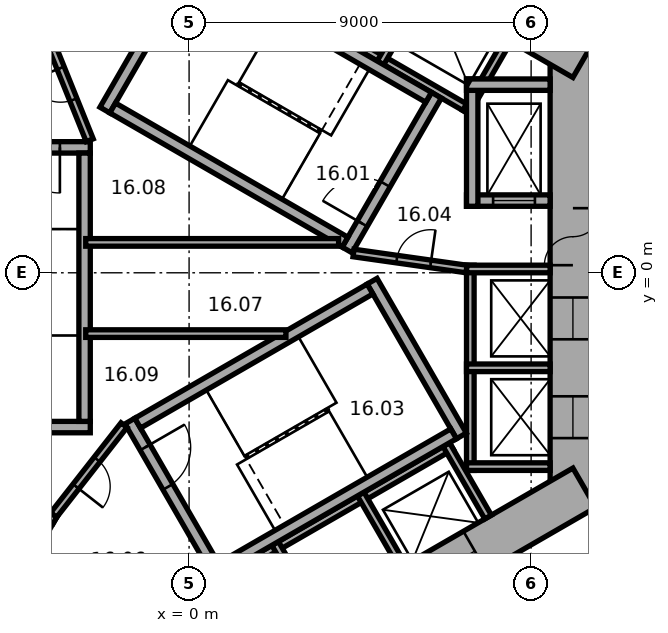
"""IFC4 building model, lengths in metres.
Left out: names, types, materials, properties, quantities, classifications, styles, units other than length and angle.
Written with IfcOpenShell. Run it as: python <this file> out.ifc"""

import sys

from ifc_helpers import new_model, si_unit, direction, frame, frame_2d, origin, place, context, subcontext, project, spatial, rectangle, extrude, element, fill, save


model = new_model("IFC4")
c1 = context("Model", 3, precision=1e-05, world=origin(), true_north=direction((0.0, 1.0)))
c2 = subcontext(c1, "Body", "Model", "MODEL_VIEW")
j1 = project(units=[si_unit("LENGTHUNIT", "METRE"), si_unit("PLANEANGLEUNIT", "RADIAN")], contexts=[c1])
p1 = place(None, origin())
s1 = spatial("IfcSite", under=j1, at=p1, CompositionType="ELEMENT")
p2 = place(p1, origin())
s2 = spatial("IfcBuilding", under=s1, at=p2, CompositionType="ELEMENT")
p3 = place(p2, frame((0.0, 0.0, 73.7)))
s3 = spatial("IfcBuildingStorey", under=s2, at=p3, CompositionType="ELEMENT", Elevation=73.7)
p4 = place(p3, frame((10.1, -6.177, 0.0), z_axis=(0.0, 0.0, 1.0), x_axis=(0.0, 1.0, 0.0)))
e1 = element("IfcWall", 1, at=p4, inside=s3, PredefinedType="SHEAR", context=c2, shape_type="SweptSolid", body=[
    extrude(rectangle(XDim=12.355, YDim=1.2, at=frame_2d((6.177, 0.0))), origin(), (0.0, 0.0, 1.0), 3.3),
])
p5 = place(p4, frame((6.378, 0.0, 0.0)))
e2 = element("IfcOpeningElement", 2, at=p5, cuts=e1, PredefinedType="OPENING", context=c2, shape_type="SweptSolid", body=[
    extrude(rectangle(XDim=1.5, YDim=2.1, at=frame_2d((0.75, 1.05))), frame((0.0, 0.61, 0.0), z_axis=(0.0, -1.0, 0.0), x_axis=(1.0, 0.0, 0.0)), (0.0, 0.0, 1.0), 1.22),
])
p6 = place(p4, frame((1.828, 0.0, 0.0)))
e3 = element("IfcOpeningElement", 3, at=p6, cuts=e1, PredefinedType="OPENING", context=c2, shape_type="SweptSolid", body=[
    extrude(rectangle(XDim=1.1, YDim=2.1, at=frame_2d((0.55, 1.05))), frame((0.0, 0.61, 0.0), z_axis=(0.0, -1.0, 0.0), x_axis=(1.0, 0.0, 0.0)), (0.0, 0.0, 1.0), 1.22),
])
p7 = place(p4, frame((4.427, 0.0, 0.0)))
e4 = element("IfcOpeningElement", 4, at=p7, cuts=e1, PredefinedType="OPENING", context=c2, shape_type="SweptSolid", body=[
    extrude(rectangle(XDim=1.1, YDim=2.1, at=frame_2d((0.55, 1.05))), frame((0.0, 0.61, 0.0), z_axis=(0.0, -1.0, 0.0), x_axis=(1.0, 0.0, 0.0)), (0.0, 0.0, 1.0), 1.22),
])
p8 = place(p3, frame((10.4, 5.658, 0.0), z_axis=(0.0, 0.0, 1.0), x_axis=(-0.866021384402, 0.500006961711, 0.0)))
e5 = element("IfcWall", 5, at=p8, inside=s3, PredefinedType="SHEAR", context=c2, shape_type="SweptSolid", body=[
    extrude(rectangle(XDim=12.355, YDim=1.2, at=frame_2d((6.178, 0.0))), origin(), (0.0, 0.0, 1.0), 3.3),
])
p9 = place(p8, frame((2.728, 0.0, 0.0)))
e6 = element("IfcOpeningElement", 6, at=p9, cuts=e5, PredefinedType="OPENING", context=c2, shape_type="SweptSolid", body=[
    extrude(rectangle(XDim=1.1, YDim=2.1, at=frame_2d((0.55, 1.05))), frame((0.0, 0.61, 0.0), z_axis=(0.0, -1.0, 0.0), x_axis=(1.0, 0.0, 0.0)), (0.0, 0.0, 1.0), 1.22),
])
p10 = place(p8, frame((5.328, 0.0, 0.0)))
e7 = element("IfcOpeningElement", 7, at=p10, cuts=e5, PredefinedType="OPENING", context=c2, shape_type="SweptSolid", body=[
    extrude(rectangle(XDim=1.1, YDim=2.1, at=frame_2d((0.55, 1.05))), frame((0.0, 0.61, 0.0), z_axis=(0.0, -1.0, 0.0), x_axis=(1.0, 0.0, 0.0)), (0.0, 0.0, 1.0), 1.22),
])
p11 = place(p8, frame((7.928, 0.0, 0.0)))
e8 = element("IfcOpeningElement", 8, at=p11, cuts=e5, PredefinedType="OPENING", context=c2, shape_type="SweptSolid", body=[
    extrude(rectangle(XDim=1.1, YDim=2.1, at=frame_2d((0.55, 1.05))), frame((0.0, 0.61, 0.0), z_axis=(0.0, -1.0, 0.0), x_axis=(1.0, 0.0, 0.0)), (0.0, 0.0, 1.0), 1.22),
])
p12 = place(p3, frame((0.3, 11.836, 0.0), z_axis=(0.0, 0.0, 1.0), x_axis=(-0.866021384402, -0.500006961711, 0.0)))
e9 = element("IfcWall", 9, at=p12, inside=s3, PredefinedType="SHEAR", context=c2, shape_type="SweptSolid", body=[
    extrude(rectangle(XDim=12.355, YDim=1.2, at=frame_2d((6.178, 0.0))), origin(), (0.0, 0.0, 1.0), 3.3),
])
p13 = place(p12, frame((6.378, 0.0, 0.0)))
e10 = element("IfcOpeningElement", 10, at=p13, cuts=e9, PredefinedType="OPENING", context=c2, shape_type="SweptSolid", body=[
    extrude(rectangle(XDim=1.5, YDim=2.1, at=frame_2d((0.75, 1.05))), frame((0.0, 0.61, 0.0), z_axis=(0.0, -1.0, 0.0), x_axis=(1.0, 0.0, 0.0)), (0.0, 0.0, 1.0), 1.22),
])
p14 = place(p12, frame((1.828, 0.0, 0.0)))
e11 = element("IfcOpeningElement", 11, at=p14, cuts=e9, PredefinedType="OPENING", context=c2, shape_type="SweptSolid", body=[
    extrude(rectangle(XDim=1.1, YDim=2.1, at=frame_2d((0.55, 1.05))), frame((0.0, 0.61, 0.0), z_axis=(0.0, -1.0, 0.0), x_axis=(1.0, 0.0, 0.0)), (0.0, 0.0, 1.0), 1.22),
])
p15 = place(p3, frame((-10.4, -5.658, 0.0), z_axis=(0.0, 0.0, 1.0), x_axis=(0.866021384402, -0.500006961711, 0.0)))
e12 = element("IfcWall", 12, at=p15, inside=s3, PredefinedType="SHEAR", context=c2, shape_type="SweptSolid", body=[
    extrude(rectangle(XDim=12.355, YDim=1.2, at=frame_2d((6.178, 0.0))), origin(), (0.0, 0.0, 1.0), 3.3),
])
p16 = place(p15, frame((6.378, 0.0, 0.0)))
e13 = element("IfcOpeningElement", 13, at=p16, cuts=e12, PredefinedType="OPENING", context=c2, shape_type="SweptSolid", body=[
    extrude(rectangle(XDim=1.5, YDim=2.1, at=frame_2d((0.75, 1.05))), frame((0.0, 0.61, 0.0), z_axis=(0.0, -1.0, 0.0), x_axis=(1.0, 0.0, 0.0)), (0.0, 0.0, 1.0), 1.22),
])
p17 = place(p15, frame((3.228, 0.0, 0.0)))
e14 = element("IfcOpeningElement", 14, at=p17, cuts=e12, PredefinedType="OPENING", context=c2, shape_type="SweptSolid", body=[
    extrude(rectangle(XDim=0.9, YDim=2.1, at=frame_2d((0.45, 1.05))), frame((0.0, 0.61, 0.0), z_axis=(0.0, -1.0, 0.0), x_axis=(1.0, 0.0, 0.0)), (0.0, 0.0, 1.0), 1.22),
])
p18 = place(p3, frame((-0.3, -11.836, 0.0), z_axis=(0.0, 0.0, 1.0), x_axis=(0.866021384402, 0.500006961711, 0.0)))
e15 = element("IfcWall", 15, at=p18, inside=s3, PredefinedType="SHEAR", context=c2, shape_type="SweptSolid", body=[
    extrude(rectangle(XDim=12.355, YDim=1.2, at=frame_2d((6.178, 0.0))), origin(), (0.0, 0.0, 1.0), 3.3),
])
p19 = place(p18, frame((2.828, 0.0, 0.0)))
e16 = element("IfcOpeningElement", 16, at=p19, cuts=e15, PredefinedType="OPENING", context=c2, shape_type="SweptSolid", body=[
    extrude(rectangle(XDim=0.9, YDim=2.1, at=frame_2d((0.45, 1.05))), frame((0.0, 0.61, 0.0), z_axis=(0.0, -1.0, 0.0), x_axis=(1.0, 0.0, 0.0)), (0.0, 0.0, 1.0), 1.22),
])
p20 = place(p18, frame((5.428, 0.0, 0.0)))
e17 = element("IfcOpeningElement", 17, at=p20, cuts=e15, PredefinedType="OPENING", context=c2, shape_type="SweptSolid", body=[
    extrude(rectangle(XDim=0.9, YDim=2.1, at=frame_2d((0.45, 1.05))), frame((0.0, 0.61, 0.0), z_axis=(0.0, -1.0, 0.0), x_axis=(1.0, 0.0, 0.0)), (0.0, 0.0, 1.0), 1.22),
])
p21 = place(p18, frame((7.928, 0.0, 0.0)))
e18 = element("IfcOpeningElement", 18, at=p21, cuts=e15, PredefinedType="OPENING", context=c2, shape_type="SweptSolid", body=[
    extrude(rectangle(XDim=1.1, YDim=2.1, at=frame_2d((0.55, 1.05))), frame((0.0, 0.61, 0.0), z_axis=(0.0, -1.0, 0.0), x_axis=(1.0, 0.0, 0.0)), (0.0, 0.0, 1.0), 1.22),
])
p22 = place(p3, frame((7.4, -5.2, 0.0), z_axis=(0.0, 0.0, 1.0), x_axis=(0.0, 1.0, 0.0)))
e19 = element("IfcWall", 19, at=p22, inside=s3, PredefinedType="PARTITIONING", context=c2, shape_type="SweptSolid", body=[
    extrude(rectangle(XDim=5.4, YDim=0.2, at=frame_2d((2.7, 0.0))), origin(), (0.0, 0.0, 1.0), 2.95),
])
for number, where, z_axis, x_axis in (
    (20, (7.3, -5.1, 0.0), (0.0, 0.0, 1.0), (1.0, 0.0, 0.0)),
    (21, (7.3, -2.5, 0.0), (0.0, 0.0, 1.0), (1.0, 0.0, 0.0)),
    (22, (7.3, 0.1, 0.0), (0.0, 0.0, 1.0), (1.0, 0.0, 0.0)),
):
    element("IfcWall", number, at=place(p3, frame(where, z_axis=z_axis, x_axis=x_axis)), inside=s3, PredefinedType="PARTITIONING", context=c2, shape_type="SweptSolid", body=[
        extrude(rectangle(XDim=2.2, YDim=0.2, at=frame_2d((1.1, 0.0))), origin(), (0.0, 0.0, 1.0), 2.95),
    ])
p23 = place(p3, frame((7.424, 4.259, 0.0), z_axis=(0.0, 0.0, 1.0), x_axis=(-0.866026010844, 0.49999894854, 0.0)))
e23 = element("IfcWall", 23, at=p23, inside=s3, PredefinedType="PARTITIONING", context=c2, shape_type="SweptSolid", body=[
    extrude(rectangle(XDim=8.0, YDim=0.2, at=frame_2d((4.0, 0.0))), origin(), (0.0, 0.0, 1.0), 2.95),
])
for number, where, z_axis, x_axis in (
    (24, (7.287, 4.222, 0.0), (0.0, 0.0, 1.0), (0.5, 0.866, 0.0)),
    (25, (5.036, 5.522, 0.0), (0.0, 0.0, 1.0), (0.5, 0.866, 0.0)),
):
    element("IfcWall", number, at=place(p3, frame(where, z_axis=z_axis, x_axis=x_axis)), inside=s3, PredefinedType="PARTITIONING", context=c2, shape_type="SweptSolid", body=[
        extrude(rectangle(XDim=2.2, YDim=0.2, at=frame_2d((1.1, 0.0))), origin(), (0.0, 0.0, 1.0), 2.95),
    ])
p24 = place(p3, frame((-8.203, -3.809, 0.0), z_axis=(0.0, 0.0, 1.0), x_axis=(0.866028230842, -0.499995103361, 0.0)))
e26 = element("IfcWall", 26, at=p24, inside=s3, PredefinedType="PARTITIONING", context=c2, shape_type="SweptSolid", body=[
    extrude(rectangle(XDim=5.4, YDim=0.2, at=frame_2d((2.7, 0.0))), origin(), (0.0, 0.0, 1.0), 2.95),
])
p25 = place(p3, frame((-3.563, -6.372, 0.0), z_axis=(0.0, 0.0, 1.0), x_axis=(-0.499994660107, -0.866028486751, 0.0)))
e27 = element("IfcWall", 27, at=p25, inside=s3, PredefinedType="PARTITIONING", context=c2, shape_type="SweptSolid", body=[
    extrude(rectangle(XDim=2.2, YDim=0.2, at=frame_2d((1.1, 0.0))), origin(), (0.0, 0.0, 1.0), 2.95),
])
p26 = place(p3, frame((-0.024, -8.559, 0.0), z_axis=(0.0, 0.0, 1.0), x_axis=(0.866026010844, 0.49999894854, 0.0)))
e28 = element("IfcWall", 28, at=p26, inside=s3, PredefinedType="PARTITIONING", context=c2, shape_type="SweptSolid", body=[
    extrude(rectangle(XDim=8.0, YDim=0.2, at=frame_2d((4.0, 0.0))), origin(), (0.0, 0.0, 1.0), 2.95),
])
for number, where, z_axis, x_axis in (
    (29, (2.264, -7.122, 0.0), (0.0, 0.0, 1.0), (0.5, -0.866, 0.0)),
    (30, (4.516, -5.822, 0.0), (0.0, 0.0, 1.0), (0.5, -0.866, 0.0)),
    (31, (6.768, -4.522, 0.0), (0.0, 0.0, 1.0), (0.5, -0.866, 0.0)),
):
    element("IfcWall", number, at=place(p3, frame(where, z_axis=z_axis, x_axis=x_axis)), inside=s3, PredefinedType="PARTITIONING", context=c2, shape_type="SweptSolid", body=[
        extrude(rectangle(XDim=2.2, YDim=0.2, at=frame_2d((1.1, 0.0))), origin(), (0.0, 0.0, 1.0), 2.95),
    ])
p27 = place(p3, frame((4.158, 0.602, 0.0), z_axis=(0.0, 0.0, 1.0), x_axis=(0.499977259774, 0.866038532462, 0.0)))
e32 = element("IfcWall", 32, at=p27, inside=s3, PredefinedType="SHEAR", context=c2, shape_type="SweptSolid", body=[
    extrude(rectangle(XDim=4.7, YDim=0.3, at=frame_2d((2.35, 0.0))), origin(), (0.0, 0.0, 1.0), 2.95),
])
p28 = place(p27, frame((0.8, 0.0, 0.0)))
e33 = element("IfcOpeningElement", 33, at=p28, cuts=e32, PredefinedType="OPENING", context=c2, shape_type="SweptSolid", body=[
    extrude(rectangle(XDim=1.2, YDim=2.1, at=frame_2d((0.6, 1.05))), frame((0.0, 0.16, 0.0), z_axis=(0.0, -1.0, 0.0), x_axis=(1.0, 0.0, 0.0)), (0.0, 0.0, 1.0), 0.32),
])
p29 = place(p3, frame((-2.216, 4.282, 0.0), z_axis=(0.0, 0.0, 1.0), x_axis=(0.499977259774, 0.866038532462, 0.0)))
e34 = element("IfcWall", 34, at=p29, inside=s3, PredefinedType="SHEAR", context=c2, shape_type="SweptSolid", body=[
    extrude(rectangle(XDim=4.7, YDim=0.3, at=frame_2d((2.35, 0.0))), origin(), (0.0, 0.0, 1.0), 2.95),
])
for number, where, z_axis, x_axis in (
    (35, (4.103, 0.807, 0.0), (0.0, 0.0, 1.0), (-0.866, 0.5, 0.0)),
    (36, (6.303, 4.617, 0.0), (0.0, 0.0, 1.0), (-0.866, 0.5, 0.0)),
):
    element("IfcWall", number, at=place(p3, frame(where, z_axis=z_axis, x_axis=x_axis)), inside=s3, PredefinedType="SHEAR", context=c2, shape_type="SweptSolid", body=[
        extrude(rectangle(XDim=7.06, YDim=0.3, at=frame_2d((3.53, 0.0))), origin(), (0.0, 0.0, 1.0), 2.95),
    ])
p30 = place(p3, frame((-2.6, 3.3, 0.0), z_axis=(0.0, 0.0, 1.0), x_axis=(-1.0, 0.0, 0.0)))
e37 = element("IfcWall", 37, at=p30, inside=s3, PredefinedType="SHEAR", context=c2, shape_type="SweptSolid", body=[
    extrude(rectangle(XDim=4.7, YDim=0.3, at=frame_2d((2.35, 0.0))), origin(), (0.0, 0.0, 1.0), 2.95),
])
p31 = place(p30, frame((0.8, 0.0, 0.0)))
e38 = element("IfcOpeningElement", 38, at=p31, cuts=e37, PredefinedType="OPENING", context=c2, shape_type="SweptSolid", body=[
    extrude(rectangle(XDim=1.2, YDim=2.1, at=frame_2d((0.6, 1.05))), frame((0.0, 0.16, 0.0), z_axis=(0.0, -1.0, 0.0), x_axis=(1.0, 0.0, 0.0)), (0.0, 0.0, 1.0), 0.32),
])
p32 = place(p3, frame((-2.6, -4.06, 0.0), z_axis=(0.0, 0.0, 1.0), x_axis=(-1.0, 0.0, 0.0)))
e39 = element("IfcWall", 39, at=p32, inside=s3, PredefinedType="SHEAR", context=c2, shape_type="SweptSolid", body=[
    extrude(rectangle(XDim=4.7, YDim=0.3, at=frame_2d((2.35, 0.0))), origin(), (0.0, 0.0, 1.0), 2.95),
])
p33 = place(p3, frame((-2.75, 3.15, 0.0), z_axis=(0.0, 0.0, 1.0), x_axis=(0.0, -1.0, 0.0)))
e40 = element("IfcWall", 40, at=p33, inside=s3, PredefinedType="SHEAR", context=c2, shape_type="SweptSolid", body=[
    extrude(rectangle(XDim=7.06, YDim=0.3, at=frame_2d((3.53, 0.0))), origin(), (0.0, 0.0, 1.0), 2.95),
])
p34 = place(p3, frame((-1.558, -3.902, 0.0), z_axis=(0.0, 0.0, 1.0), x_axis=(0.499977259774, -0.866038532462, 0.0)))
e41 = element("IfcWall", 41, at=p34, inside=s3, PredefinedType="SHEAR", context=c2, shape_type="SweptSolid", body=[
    extrude(rectangle(XDim=4.7, YDim=0.3, at=frame_2d((2.35, 0.0))), origin(), (0.0, 0.0, 1.0), 2.95),
])
p35 = place(p34, frame((0.8, 0.0, 0.0)))
e42 = element("IfcOpeningElement", 42, at=p35, cuts=e41, PredefinedType="OPENING", context=c2, shape_type="SweptSolid", body=[
    extrude(rectangle(XDim=1.2, YDim=2.1, at=frame_2d((0.6, 1.05))), frame((0.0, 0.16, 0.0), z_axis=(0.0, -1.0, 0.0), x_axis=(1.0, 0.0, 0.0)), (0.0, 0.0, 1.0), 0.32),
])
p36 = place(p3, frame((4.816, -0.222, 0.0), z_axis=(0.0, 0.0, 1.0), x_axis=(0.499977259774, -0.866038532462, 0.0)))
e43 = element("IfcWall", 43, at=p36, inside=s3, PredefinedType="SHEAR", context=c2, shape_type="SweptSolid", body=[
    extrude(rectangle(XDim=4.7, YDim=0.3, at=frame_2d((2.35, 0.0))), origin(), (0.0, 0.0, 1.0), 2.95),
])
for number, where, z_axis, x_axis in (
    (44, (-1.353, -3.957, 0.0), (0.0, 0.0, 1.0), (0.866, 0.5, 0.0)),
    (45, (0.847, -7.767, 0.0), (0.0, 0.0, 1.0), (0.866, 0.5, 0.0)),
):
    element("IfcWall", number, at=place(p3, frame(where, z_axis=z_axis, x_axis=x_axis)), inside=s3, PredefinedType="SHEAR", context=c2, shape_type="SweptSolid", body=[
        extrude(rectangle(XDim=7.06, YDim=0.3, at=frame_2d((3.53, 0.0))), origin(), (0.0, 0.0, 1.0), 2.95),
    ])
p37 = place(p3, frame((7.3, 1.9, 0.0), z_axis=(0.0, 0.0, 1.0), x_axis=(1.0, 0.0, 0.0)))
e46 = element("IfcWall", 46, at=p37, inside=s3, PredefinedType="SHEAR", context=c2, shape_type="SweptSolid", body=[
    extrude(rectangle(XDim=2.2, YDim=0.3, at=frame_2d((1.1, 0.0))), origin(), (0.0, 0.0, 1.0), 2.95),
])
p38 = place(p37, frame((0.7, 0.0, 0.0)))
e47 = element("IfcOpeningElement", 47, at=p38, cuts=e46, PredefinedType="OPENING", context=c2, shape_type="SweptSolid", body=[
    extrude(rectangle(XDim=1.1, YDim=2.1, at=frame_2d((0.55, 1.05))), frame((0.0, 0.16, 0.0), z_axis=(0.0, -1.0, 0.0), x_axis=(1.0, 0.0, 0.0)), (0.0, 0.0, 1.0), 0.32),
])
p39 = place(p3, frame((7.45, 1.75, 0.0), z_axis=(0.0, 0.0, 1.0), x_axis=(0.0, 1.0, 0.0)))
e48 = element("IfcWall", 48, at=p39, inside=s3, PredefinedType="SHEAR", context=c2, shape_type="SweptSolid", body=[
    extrude(rectangle(XDim=3.35, YDim=0.3, at=frame_2d((1.675, 0.0))), origin(), (0.0, 0.0, 1.0), 2.95),
])
p40 = place(p3, frame((7.3, 4.95, 0.0), z_axis=(0.0, 0.0, 1.0), x_axis=(1.0, 0.0, 0.0)))
e49 = element("IfcWall", 49, at=p40, inside=s3, PredefinedType="SHEAR", context=c2, shape_type="SweptSolid", body=[
    extrude(rectangle(XDim=2.2, YDim=0.3, at=frame_2d((1.1, 0.0))), origin(), (0.0, 0.0, 1.0), 2.95),
])
p41 = place(p3, frame((4.327, 0.521, 0.0), z_axis=(0.0, 0.0, 1.0), x_axis=(0.990124376366, -0.14019172346, 0.0)))
e50 = element("IfcWall", 50, at=p41, inside=s3, PredefinedType="PARTITIONING", context=c2, shape_type="SweptSolid", body=[
    extrude(rectangle(XDim=3.002, YDim=0.2, at=frame_2d((1.501, 0.0))), origin(), (0.0, 0.0, 1.0), 2.95),
])
p42 = place(p41, frame((1.15, 0.0, 0.0)))
e51 = element("IfcOpeningElement", 51, at=p42, cuts=e50, PredefinedType="OPENING", context=c2, shape_type="SweptSolid", body=[
    extrude(rectangle(XDim=0.9, YDim=2.1, at=frame_2d((0.45, 1.05))), frame((0.0, 0.11, 0.0), z_axis=(0.0, -1.0, 0.0), x_axis=(1.0, 0.0, 0.0)), (0.0, 0.0, 1.0), 0.22),
])
p43 = place(p3, frame((-2.615, 3.487, 0.0), z_axis=(0.0, 0.0, 1.0), x_axis=(-0.373576831041, 0.92759924068, 0.0)))
e52 = element("IfcWall", 52, at=p43, inside=s3, PredefinedType="PARTITIONING", context=c2, shape_type="SweptSolid", body=[
    extrude(rectangle(XDim=3.002, YDim=0.2, at=frame_2d((1.501, 0.0))), origin(), (0.0, 0.0, 1.0), 2.95),
])
p44 = place(p43, frame((1.15, 0.0, 0.0)))
e53 = element("IfcOpeningElement", 53, at=p44, cuts=e52, PredefinedType="OPENING", context=c2, shape_type="SweptSolid", body=[
    extrude(rectangle(XDim=0.9, YDim=2.1, at=frame_2d((0.45, 1.05))), frame((0.0, 0.11, 0.0), z_axis=(0.0, -1.0, 0.0), x_axis=(1.0, 0.0, 0.0)), (0.0, 0.0, 1.0), 0.22),
])
p45 = place(p3, frame((-1.712, -4.008, 0.0), z_axis=(0.0, 0.0, 1.0), x_axis=(-0.616549420702, -0.787316208287, 0.0)))
e54 = element("IfcWall", 54, at=p45, inside=s3, PredefinedType="PARTITIONING", context=c2, shape_type="SweptSolid", body=[
    extrude(rectangle(XDim=3.002, YDim=0.2, at=frame_2d((1.501, 0.0))), origin(), (0.0, 0.0, 1.0), 2.95),
])
p46 = place(p45, frame((1.15, 0.0, 0.0)))
e55 = element("IfcOpeningElement", 55, at=p46, cuts=e54, PredefinedType="OPENING", context=c2, shape_type="SweptSolid", body=[
    extrude(rectangle(XDim=0.9, YDim=2.1, at=frame_2d((0.45, 1.05))), frame((0.0, 0.11, 0.0), z_axis=(0.0, -1.0, 0.0), x_axis=(1.0, 0.0, 0.0)), (0.0, 0.0, 1.0), 0.22),
])
p47 = place(p3, frame((-2.72, -1.6, 0.0), z_axis=(0.0, 0.0, 1.0), x_axis=(1.0, 0.0, 0.0)))
e56 = element("IfcWall", 56, at=p47, inside=s3, PredefinedType="PARTITIONING", context=c2, shape_type="SweptSolid", body=[
    extrude(rectangle(XDim=5.269, YDim=0.2, at=frame_2d((2.634, 0.0))), origin(), (0.0, 0.0, 1.0), 2.95),
])
p48 = place(p3, frame((-2.72, 0.8, 0.0), z_axis=(0.0, 0.0, 1.0), x_axis=(1.0, 0.0, 0.0)))
e57 = element("IfcWall", 57, at=p48, inside=s3, PredefinedType="PARTITIONING", context=c2, shape_type="SweptSolid", body=[
    extrude(rectangle(XDim=6.654, YDim=0.2, at=frame_2d((3.327, 0.0))), origin(), (0.0, 0.0, 1.0), 2.95),
])
p49 = place(p5, origin())
e58 = element("IfcDoor", 58, at=p49, inside=s3, OperationType="DOUBLE_DOOR_SINGLE_SWING", PredefinedType="DOOR", context=c2, shape_type="SweptSolid", body=[
    extrude(rectangle(XDim=1.5, YDim=2.1, at=frame_2d((0.75, 1.05))), frame((0.0, 0.025, 0.0), z_axis=(0.0, -1.0, 0.0), x_axis=(1.0, 0.0, 0.0)), (0.0, 0.0, 1.0), 0.05),
])
fill(e2, e58)
p50 = place(p28, origin())
e59 = element("IfcDoor", 59, at=p50, inside=s3, OperationType="SINGLE_SWING_RIGHT", PredefinedType="DOOR", context=c2, shape_type="SweptSolid", body=[
    extrude(rectangle(XDim=1.2, YDim=2.1, at=frame_2d((0.6, 1.05))), frame((0.0, 0.025, 0.0), z_axis=(0.0, -1.0, 0.0), x_axis=(1.0, 0.0, 0.0)), (0.0, 0.0, 1.0), 0.05),
])
fill(e33, e59)
p51 = place(p31, origin())
e60 = element("IfcDoor", 60, at=p51, inside=s3, OperationType="SINGLE_SWING_RIGHT", PredefinedType="DOOR", context=c2, shape_type="SweptSolid", body=[
    extrude(rectangle(XDim=1.2, YDim=2.1, at=frame_2d((0.6, 1.05))), frame((0.0, 0.025, 0.0), z_axis=(0.0, -1.0, 0.0), x_axis=(1.0, 0.0, 0.0)), (0.0, 0.0, 1.0), 0.05),
])
fill(e38, e60)
p52 = place(p35, origin())
e61 = element("IfcDoor", 61, at=p52, inside=s3, OperationType="SINGLE_SWING_RIGHT", PredefinedType="DOOR", context=c2, shape_type="SweptSolid", body=[
    extrude(rectangle(XDim=1.2, YDim=2.1, at=frame_2d((0.6, 1.05))), frame((0.0, 0.025, 0.0), z_axis=(0.0, -1.0, 0.0), x_axis=(1.0, 0.0, 0.0)), (0.0, 0.0, 1.0), 0.05),
])
fill(e42, e61)
p53 = place(p42, origin())
e62 = element("IfcDoor", 62, at=p53, inside=s3, OperationType="SINGLE_SWING_LEFT", PredefinedType="DOOR", context=c2, shape_type="SweptSolid", body=[
    extrude(rectangle(XDim=0.9, YDim=2.1, at=frame_2d((0.45, 1.05))), frame((0.0, 0.025, 0.0), z_axis=(0.0, -1.0, 0.0), x_axis=(1.0, 0.0, 0.0)), (0.0, 0.0, 1.0), 0.05),
])
fill(e51, e62)
p54 = place(p44, origin())
e63 = element("IfcDoor", 63, at=p54, inside=s3, OperationType="SINGLE_SWING_LEFT", PredefinedType="DOOR", context=c2, shape_type="SweptSolid", body=[
    extrude(rectangle(XDim=0.9, YDim=2.1, at=frame_2d((0.45, 1.05))), frame((0.0, 0.025, 0.0), z_axis=(0.0, -1.0, 0.0), x_axis=(1.0, 0.0, 0.0)), (0.0, 0.0, 1.0), 0.05),
])
fill(e53, e63)
p55 = place(p46, origin())
e64 = element("IfcDoor", 64, at=p55, inside=s3, OperationType="SINGLE_SWING_LEFT", PredefinedType="DOOR", context=c2, shape_type="SweptSolid", body=[
    extrude(rectangle(XDim=0.9, YDim=2.1, at=frame_2d((0.45, 1.05))), frame((0.0, 0.025, 0.0), z_axis=(0.0, -1.0, 0.0), x_axis=(1.0, 0.0, 0.0)), (0.0, 0.0, 1.0), 0.05),
])
fill(e55, e64)
p56 = place(p38, origin())
e65 = element("IfcDoor", 65, at=p56, inside=s3, OperationType="DOUBLE_DOOR_SLIDING", PredefinedType="DOOR", context=c2, shape_type="SweptSolid", body=[
    extrude(rectangle(XDim=1.1, YDim=2.1, at=frame_2d((0.55, 1.05))), frame((0.0, 0.025, 0.0), z_axis=(0.0, -1.0, 0.0), x_axis=(1.0, 0.0, 0.0)), (0.0, 0.0, 1.0), 0.05),
])
fill(e47, e65)
p57 = place(p6, origin())
e66 = element("IfcDoor", 66, at=p57, inside=s3, OperationType="DOUBLE_DOOR_SLIDING", PredefinedType="DOOR", context=c2, shape_type="SweptSolid", body=[
    extrude(rectangle(XDim=1.1, YDim=2.1, at=frame_2d((0.55, 1.05))), frame((0.0, 0.025, 0.0), z_axis=(0.0, -1.0, 0.0), x_axis=(1.0, 0.0, 0.0)), (0.0, 0.0, 1.0), 0.05),
])
fill(e3, e66)
p58 = place(p7, origin())
e67 = element("IfcDoor", 67, at=p58, inside=s3, OperationType="DOUBLE_DOOR_SLIDING", PredefinedType="DOOR", context=c2, shape_type="SweptSolid", body=[
    extrude(rectangle(XDim=1.1, YDim=2.1, at=frame_2d((0.55, 1.05))), frame((0.0, 0.025, 0.0), z_axis=(0.0, -1.0, 0.0), x_axis=(1.0, 0.0, 0.0)), (0.0, 0.0, 1.0), 0.05),
])
fill(e4, e67)
p59 = place(p21, origin())
e68 = element("IfcDoor", 68, at=p59, inside=s3, OperationType="DOUBLE_DOOR_SLIDING", PredefinedType="DOOR", context=c2, shape_type="SweptSolid", body=[
    extrude(rectangle(XDim=1.1, YDim=2.1, at=frame_2d((0.55, 1.05))), frame((0.0, 0.025, 0.0), z_axis=(0.0, -1.0, 0.0), x_axis=(1.0, 0.0, 0.0)), (0.0, 0.0, 1.0), 0.05),
])
fill(e18, e68)
save(model, sys.argv[1])
